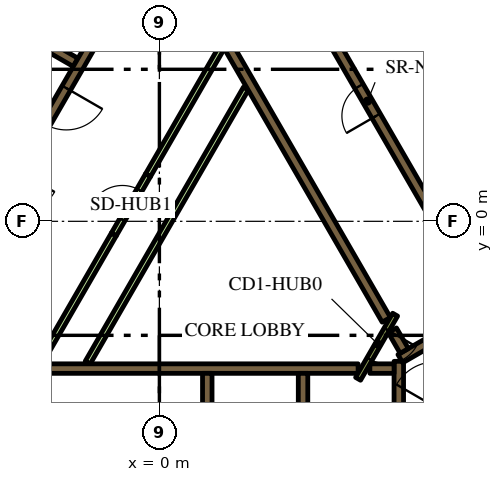
"""IFC4 building model, lengths in metres.
Left out: names, types, materials, properties, quantities, classifications, styles, units other than length and angle.
Written with IfcOpenShell. Run it as: python <this file> out.ifc"""

import sys

from ifc_helpers import new_model, si_unit, direction, frame, frame_2d, origin, place, context, subcontext, project, spatial, rectangle, extrude, element, fill, save


model = new_model("IFC4")
c1 = context("Model", 3, precision=1e-05, world=origin(), true_north=direction((0.0, 1.0)))
c2 = subcontext(c1, "Body", "Model", "MODEL_VIEW")
j1 = project(units=[si_unit("LENGTHUNIT", "METRE"), si_unit("PLANEANGLEUNIT", "RADIAN")], contexts=[c1])
p1 = place(None, origin())
s1 = spatial("IfcSite", under=j1, at=p1, CompositionType="ELEMENT")
p2 = place(p1, origin())
s2 = spatial("IfcBuilding", under=s1, at=p2, CompositionType="ELEMENT")
p3 = place(p2, frame((0.0, 0.0, 70.5)))
s3 = spatial("IfcBuildingStorey", under=s2, at=p3, CompositionType="ELEMENT", Elevation=70.5)
p4 = place(p3, frame((6.461, 13.909, 0.0), z_axis=(0.0, 0.0, 1.0), x_axis=(0.500005804227, -0.866022052686, 0.0)))
e1 = element("IfcWall", 1, at=p4, inside=s3, PredefinedType="SOLIDWALL", context=c2, shape_type="SweptSolid", body=[
    extrude(rectangle(XDim=20.834, YDim=0.9, at=frame_2d((10.417, 0.0))), origin(), (0.0, 0.0, 1.0), 3.9),
])
p5 = place(p3, frame((-5.259, -3.875, 0.0), z_axis=(0.0, 0.0, 1.0), x_axis=(1.0, 0.0, 0.0)))
e2 = element("IfcWall", 2, at=p5, inside=s3, PredefinedType="SOLIDWALL", context=c2, shape_type="SweptSolid", body=[
    extrude(rectangle(XDim=10.489, YDim=0.25, at=frame_2d((5.244, 0.0))), origin(), (0.0, 0.0, 1.0), 3.9),
])
for number, where, z_axis, x_axis in (
    (3, (3.78, -4.0, 0.0), (0.0, 0.0, 1.0), (0.0, -1.0, 0.0)),
    (4, (1.26, -4.0, 0.0), (0.0, 0.0, 1.0), (0.0, -1.0, 0.0)),
):
    element("IfcWall", number, at=place(p3, frame(where, z_axis=z_axis, x_axis=x_axis)), inside=s3, PredefinedType="SOLIDWALL", context=c2, shape_type="SweptSolid", body=[
        extrude(rectangle(XDim=2.2, YDim=0.25, at=frame_2d((1.1, 0.0))), origin(), (0.0, 0.0, 1.0), 3.9),
    ])
p6 = place(p3, frame((6.3, -7.27, 0.0), z_axis=(0.0, 0.0, 1.0), x_axis=(0.0, 1.0, 0.0)))
e5 = element("IfcWall", 5, at=p6, inside=s3, PredefinedType="SOLIDWALL", context=c2, shape_type="SweptSolid", body=[
    extrude(rectangle(XDim=3.586, YDim=0.25, at=frame_2d((1.793, 0.0))), origin(), (0.0, 0.0, 1.0), 3.9),
])
p7 = place(p3, frame((5.538, -3.875, 0.0), z_axis=(0.0, 0.0, 1.0), x_axis=(1.0, 0.0, 0.0)))
e6 = element("IfcWall", 6, at=p7, inside=s3, PredefinedType="SOLIDWALL", context=c2, shape_type="SweptSolid", body=[
    extrude(rectangle(XDim=0.637, YDim=0.25, at=frame_2d((0.318, 0.0))), origin(), (0.0, 0.0, 1.0), 3.9),
])
p8 = place(p3, frame((9.346, -1.879, 0.0), z_axis=(0.0, 0.0, 1.0), x_axis=(-0.866048528039, -0.499959945477, 0.0)))
e7 = element("IfcWall", 7, at=p8, inside=s3, PredefinedType="SOLIDWALL", context=c2, shape_type="SweptSolid", body=[
    extrude(rectangle(XDim=3.47, YDim=0.25, at=frame_2d((1.735, 0.0))), origin(), (0.0, 0.0, 1.0), 3.9),
])
p9 = place(p3, frame((6.13, -2.867, 0.0), z_axis=(0.0, 0.0, 1.0), x_axis=(0.500160776593, -0.865932559475, 0.0)))
e8 = element("IfcWall", 8, at=p9, inside=s3, PredefinedType="SOLIDWALL", context=c2, shape_type="SweptSolid", body=[
    extrude(rectangle(XDim=0.627, YDim=0.25, at=frame_2d((0.313, 0.0))), origin(), (0.0, 0.0, 1.0), 3.9),
])
p10 = place(p3, frame((5.97, -2.591, 0.0), z_axis=(0.0, 0.0, 1.0), x_axis=(-0.499994469932, 0.866028596547, 0.0)))
e9 = element("IfcWall", 9, at=p10, inside=s3, PredefinedType="SOLIDWALL", context=c2, shape_type="SweptSolid", body=[
    extrude(rectangle(XDim=10.488, YDim=0.25, at=frame_2d((5.244, 0.0))), origin(), (0.0, 0.0, 1.0), 3.9),
])
p11 = place(p3, frame((-8.06, -1.311, 0.0), z_axis=(0.0, 0.0, 1.0), x_axis=(0.50000273126, 0.866023826885, 0.0)))
e10 = element("IfcWall", 10, at=p11, inside=s3, PredefinedType="SOLIDWALL", context=c2, shape_type="SweptSolid", body=[
    extrude(rectangle(XDim=10.33, YDim=0.25, at=frame_2d((5.165, 0.0))), origin(), (0.0, 0.0, 1.0), 3.9),
])
p12 = place(p3, frame((-2.204, 4.182, 0.0), z_axis=(0.0, 0.0, 1.0), x_axis=(-0.866008176907, 0.50002983664, 0.0)))
e11 = element("IfcWall", 11, at=p12, inside=s3, PredefinedType="SOLIDWALL", context=c2, shape_type="SweptSolid", body=[
    extrude(rectangle(XDim=2.2, YDim=0.25, at=frame_2d((1.1, 0.0))), origin(), (0.0, 0.0, 1.0), 3.9),
])
p13 = place(p3, frame((-3.147, -3.718, 0.0), z_axis=(0.0, 0.0, 1.0), x_axis=(0.500010131483, 0.866019554291, 0.0)))
e12 = element("IfcWall", 12, at=p13, inside=s3, PredefinedType="PARTITIONING", context=c2, shape_type="SweptSolid", body=[
    extrude(rectangle(XDim=3.894, YDim=0.15, at=frame_2d((1.947, 0.0))), origin(), (0.0, 0.0, 1.0), 2.75),
])
p14 = place(p3, frame((-1.887, -3.718, 0.0), z_axis=(0.0, 0.0, 1.0), x_axis=(0.500005008002, 0.866022512394, 0.0)))
e13 = element("IfcWall", 13, at=p14, inside=s3, PredefinedType="PARTITIONING", context=c2, shape_type="SweptSolid", body=[
    extrude(rectangle(XDim=8.327, YDim=0.15, at=frame_2d((4.164, 0.0))), origin(), (0.0, 0.0, 1.0), 2.75),
])
p15 = place(p3, frame((-0.3, 1.212, 0.0), z_axis=(0.0, 0.0, 1.0), x_axis=(0.499963101113, 0.866046706318, 0.0)))
e14 = element("IfcWall", 14, at=p15, inside=s3, PredefinedType="PARTITIONING", context=c2, shape_type="SweptSolid", body=[
    extrude(rectangle(XDim=3.893, YDim=0.15, at=frame_2d((1.947, 0.0))), origin(), (0.0, 0.0, 1.0), 2.75),
])
p16 = place(p3, frame((11.553, -0.46, 0.0), z_axis=(0.0, 0.0, 1.0), x_axis=(-0.500006514828, 0.866021642414, 0.0)))
e15 = element("IfcWall", 15, at=p16, inside=s3, PredefinedType="SOLIDWALL", context=c2, shape_type="SweptSolid", body=[
    extrude(rectangle(XDim=12.35, YDim=0.25, at=frame_2d((6.175, 0.0))), origin(), (0.0, 0.0, 1.0), 3.9),
])
p17 = place(p16, frame((0.585, 0.0, 0.0)))
e16 = element("IfcOpeningElement", 16, at=p17, cuts=e15, PredefinedType="OPENING", context=c2, shape_type="SweptSolid", body=[
    extrude(rectangle(XDim=1.1, YDim=2.1, at=frame_2d((0.55, 1.05))), frame((0.0, 0.135, 0.0), z_axis=(0.0, -1.0, 0.0), x_axis=(1.0, 0.0, 0.0)), (0.0, 0.0, 1.0), 0.27),
])
p18 = place(p16, frame((3.105, 0.0, 0.0)))
e17 = element("IfcOpeningElement", 17, at=p18, cuts=e15, PredefinedType="OPENING", context=c2, shape_type="SweptSolid", body=[
    extrude(rectangle(XDim=1.1, YDim=2.1, at=frame_2d((0.55, 1.05))), frame((0.0, 0.135, 0.0), z_axis=(0.0, -1.0, 0.0), x_axis=(1.0, 0.0, 0.0)), (0.0, 0.0, 1.0), 0.27),
])
p19 = place(p16, frame((5.625, 0.0, 0.0)))
e18 = element("IfcOpeningElement", 18, at=p19, cuts=e15, PredefinedType="OPENING", context=c2, shape_type="SweptSolid", body=[
    extrude(rectangle(XDim=1.1, YDim=2.1, at=frame_2d((0.55, 1.05))), frame((0.0, 0.135, 0.0), z_axis=(0.0, -1.0, 0.0), x_axis=(1.0, 0.0, 0.0)), (0.0, 0.0, 1.0), 0.27),
])
p20 = place(p3, frame((8.565, -2.185, 0.0), z_axis=(0.0, 0.0, 1.0), x_axis=(-0.499997954832, 0.866026584559, 0.0)))
e19 = element("IfcWall", 19, at=p20, inside=s3, PredefinedType="SOLIDWALL", context=c2, shape_type="SweptSolid", body=[
    extrude(rectangle(XDim=12.35, YDim=0.25, at=frame_2d((6.175, 0.0))), origin(), (0.0, 0.0, 1.0), 3.9),
])
p21 = place(p20, frame((5.725, 0.0, 0.0)))
e20 = element("IfcOpeningElement", 20, at=p21, cuts=e19, PredefinedType="OPENING", context=c2, shape_type="SweptSolid", body=[
    extrude(rectangle(XDim=0.9, YDim=2.1, at=frame_2d((0.45, 1.05))), frame((0.0, 0.135, 0.0), z_axis=(0.0, -1.0, 0.0), x_axis=(1.0, 0.0, 0.0)), (0.0, 0.0, 1.0), 0.27),
])
p22 = place(p3, frame((-0.898, 6.194, 0.0), z_axis=(0.0, 0.0, 1.0), x_axis=(-0.499996202215, -0.866027596426, 0.0)))
e21 = element("IfcWall", 21, at=p22, inside=s3, PredefinedType="SOLIDWALL", context=c2, shape_type="SweptSolid", body=[
    extrude(rectangle(XDim=9.83, YDim=0.25, at=frame_2d((4.915, 0.0))), origin(), (0.0, 0.0, 1.0), 3.9),
])
p23 = place(p22, frame((0.585, 0.0, 0.0)))
e22 = element("IfcOpeningElement", 22, at=p23, cuts=e21, PredefinedType="OPENING", context=c2, shape_type="SweptSolid", body=[
    extrude(rectangle(XDim=1.1, YDim=2.1, at=frame_2d((0.55, 1.05))), frame((0.0, 0.135, 0.0), z_axis=(0.0, -1.0, 0.0), x_axis=(1.0, 0.0, 0.0)), (0.0, 0.0, 1.0), 0.27),
])
p24 = place(p22, frame((3.105, 0.0, 0.0)))
e23 = element("IfcOpeningElement", 23, at=p24, cuts=e21, PredefinedType="OPENING", context=c2, shape_type="SweptSolid", body=[
    extrude(rectangle(XDim=1.1, YDim=2.1, at=frame_2d((0.55, 1.05))), frame((0.0, 0.135, 0.0), z_axis=(0.0, -1.0, 0.0), x_axis=(1.0, 0.0, 0.0)), (0.0, 0.0, 1.0), 0.27),
])
p25 = place(p22, frame((5.625, 0.0, 0.0)))
e24 = element("IfcOpeningElement", 24, at=p25, cuts=e21, PredefinedType="OPENING", context=c2, shape_type="SweptSolid", body=[
    extrude(rectangle(XDim=1.1, YDim=2.1, at=frame_2d((0.55, 1.05))), frame((0.0, 0.135, 0.0), z_axis=(0.0, -1.0, 0.0), x_axis=(1.0, 0.0, 0.0)), (0.0, 0.0, 1.0), 0.27),
])
p26 = place(p22, frame((8.145, 0.0, 0.0)))
e25 = element("IfcOpeningElement", 25, at=p26, cuts=e21, PredefinedType="OPENING", context=c2, shape_type="SweptSolid", body=[
    extrude(rectangle(XDim=1.1, YDim=2.1, at=frame_2d((0.55, 1.05))), frame((0.0, 0.135, 0.0), z_axis=(0.0, -1.0, 0.0), x_axis=(1.0, 0.0, 0.0)), (0.0, 0.0, 1.0), 0.27),
])
p27 = place(p3, frame((7.053, -5.284, 0.0), z_axis=(0.0, 0.0, 1.0), x_axis=(0.500078061341, 0.865980330357, 0.0)))
e26 = element("IfcWall", 26, at=p27, inside=s3, PredefinedType="SOLIDWALL", context=c2, shape_type="SweptSolid", body=[
    extrude(rectangle(XDim=2.1, YDim=0.4, at=frame_2d((1.05, 0.0))), origin(), (0.0, 0.0, 1.0), 3.9),
])
p28 = place(p27, frame((0.45, 0.0, 0.0)))
e27 = element("IfcOpeningElement", 27, at=p28, cuts=e26, PredefinedType="OPENING", context=c2, shape_type="SweptSolid", body=[
    extrude(rectangle(XDim=1.2, YDim=2.1, at=frame_2d((0.6, 1.05))), frame((0.0, 0.21, 0.0), z_axis=(0.0, -1.0, 0.0), x_axis=(1.0, 0.0, 0.0)), (0.0, 0.0, 1.0), 0.42),
])
p29 = place(p3, frame((6.203, -2.456, 0.0), z_axis=(0.0, 0.0, 1.0), x_axis=(-0.500043961785, -0.866000020948, 0.0)))
e28 = element("IfcWall", 28, at=p29, inside=s3, PredefinedType="PARTITIONING", context=c2, shape_type="SweptSolid", body=[
    extrude(rectangle(XDim=1.95, YDim=0.15, at=frame_2d((0.975, 0.0))), origin(), (0.0, 0.0, 1.0), 3.9),
])
p30 = place(p29, frame((0.45, 0.0, 0.0)))
e29 = element("IfcOpeningElement", 29, at=p30, cuts=e28, PredefinedType="OPENING", context=c2, shape_type="SweptSolid", body=[
    extrude(rectangle(XDim=0.9, YDim=2.1, at=frame_2d((0.45, 1.05))), frame((0.0, 0.085, 0.0), z_axis=(0.0, -1.0, 0.0), x_axis=(1.0, 0.0, 0.0)), (0.0, 0.0, 1.0), 0.17),
])
p31 = place(p3, frame((-1.2, -0.346, 0.0), z_axis=(0.0, 0.0, 1.0), x_axis=(0.499961193289, 0.866047807691, 0.0)))
e30 = element("IfcWall", 30, at=p31, inside=s3, PredefinedType="PARTITIONING", context=c2, shape_type="SweptSolid", body=[
    extrude(rectangle(XDim=1.8, YDim=0.15, at=frame_2d((0.9, 0.0))), origin(), (0.0, 0.0, 1.0), 2.75),
])
p32 = place(p31, frame((0.45, 0.0, 0.0)))
e31 = element("IfcOpeningElement", 31, at=p32, cuts=e30, PredefinedType="OPENING", context=c2, shape_type="SweptSolid", body=[
    extrude(rectangle(XDim=0.9, YDim=2.1, at=frame_2d((0.45, 1.05))), frame((0.0, 0.085, 0.0), z_axis=(0.0, -1.0, 0.0), x_axis=(1.0, 0.0, 0.0)), (0.0, 0.0, 1.0), 0.17),
])
p33 = place(p3, frame((6.163, 18.475, 0.0), z_axis=(0.0, 0.0, 1.0), x_axis=(0.500001317485, -0.866024643133, 0.0)))
e32 = element("IfcWall", 32, at=p33, inside=s3, PredefinedType="PARTITIONING", context=c2, shape_type="SweptSolid", body=[
    extrude(rectangle(XDim=25.767, YDim=0.15, at=frame_2d((12.883, 0.0))), origin(), (0.0, 0.0, 1.0), 2.75),
])
p34 = place(p33, frame((21.138, 0.0, 0.0)))
e33 = element("IfcOpeningElement", 33, at=p34, cuts=e32, PredefinedType="OPENING", context=c2, shape_type="SweptSolid", body=[
    extrude(rectangle(XDim=1.0, YDim=2.1, at=frame_2d((0.5, 1.05))), frame((0.0, 0.085, 0.0), z_axis=(0.0, -1.0, 0.0), x_axis=(1.0, 0.0, 0.0)), (0.0, 0.0, 1.0), 0.17),
])
p35 = place(p33, frame((9.948, 0.0, 0.0)))
e34 = element("IfcOpeningElement", 34, at=p35, cuts=e32, PredefinedType="OPENING", context=c2, shape_type="SweptSolid", body=[
    extrude(rectangle(XDim=1.1, YDim=2.1, at=frame_2d((0.55, 1.05))), frame((0.0, 0.085, 0.0), z_axis=(0.0, -1.0, 0.0), x_axis=(1.0, 0.0, 0.0)), (0.0, 0.0, 1.0), 0.17),
])
p36 = place(p33, frame((8.641, 0.0, 0.0)))
e35 = element("IfcOpeningElement", 35, at=p36, cuts=e32, PredefinedType="OPENING", context=c2, shape_type="SweptSolid", body=[
    extrude(rectangle(XDim=1.0, YDim=2.1, at=frame_2d((0.5, 1.05))), frame((0.0, 0.085, 0.0), z_axis=(0.0, -1.0, 0.0), x_axis=(1.0, 0.0, 0.0)), (0.0, 0.0, 1.0), 0.17),
])
p37 = place(p33, frame((0.18, 0.0, 0.0)))
e36 = element("IfcOpeningElement", 36, at=p37, cuts=e32, PredefinedType="OPENING", context=c2, shape_type="SweptSolid", body=[
    extrude(rectangle(XDim=1.0, YDim=2.1, at=frame_2d((0.5, 1.05))), frame((0.0, 0.085, 0.0), z_axis=(0.0, -1.0, 0.0), x_axis=(1.0, 0.0, 0.0)), (0.0, 0.0, 1.0), 0.17),
])
p38 = place(p21, origin())
e37 = element("IfcDoor", 37, at=p38, inside=s3, OperationType="SINGLE_SWING_LEFT", PredefinedType="DOOR", context=c2, shape_type="SweptSolid", body=[
    extrude(rectangle(XDim=0.9, YDim=2.1, at=frame_2d((0.45, 1.05))), frame((0.0, 0.025, 0.0), z_axis=(0.0, -1.0, 0.0), x_axis=(1.0, 0.0, 0.0)), (0.0, 0.0, 1.0), 0.05),
])
fill(e20, e37)
p39 = place(p24, origin())
e38 = element("IfcDoor", 38, at=p39, inside=s3, OperationType="DOUBLE_DOOR_SLIDING", PredefinedType="DOOR", context=c2, shape_type="SweptSolid", body=[
    extrude(rectangle(XDim=1.1, YDim=2.1, at=frame_2d((0.55, 1.05))), frame((0.0, 0.025, 0.0), z_axis=(0.0, -1.0, 0.0), x_axis=(1.0, 0.0, 0.0)), (0.0, 0.0, 1.0), 0.05),
])
fill(e23, e38)
p40 = place(p30, origin())
e39 = element("IfcDoor", 39, at=p40, inside=s3, OperationType="SINGLE_SWING_LEFT", PredefinedType="DOOR", context=c2, shape_type="SweptSolid", body=[
    extrude(rectangle(XDim=0.9, YDim=2.1, at=frame_2d((0.45, 1.05))), frame((0.0, 0.025, 0.0), z_axis=(0.0, -1.0, 0.0), x_axis=(1.0, 0.0, 0.0)), (0.0, 0.0, 1.0), 0.05),
])
fill(e29, e39)
p41 = place(p32, origin())
e40 = element("IfcDoor", 40, at=p41, inside=s3, OperationType="SINGLE_SWING_LEFT", PredefinedType="DOOR", context=c2, shape_type="SweptSolid", body=[
    extrude(rectangle(XDim=0.9, YDim=2.1, at=frame_2d((0.45, 1.05))), frame((0.0, 0.025, 0.0), z_axis=(0.0, -1.0, 0.0), x_axis=(1.0, 0.0, 0.0)), (0.0, 0.0, 1.0), 0.05),
])
fill(e31, e40)
save(model, sys.argv[1])
